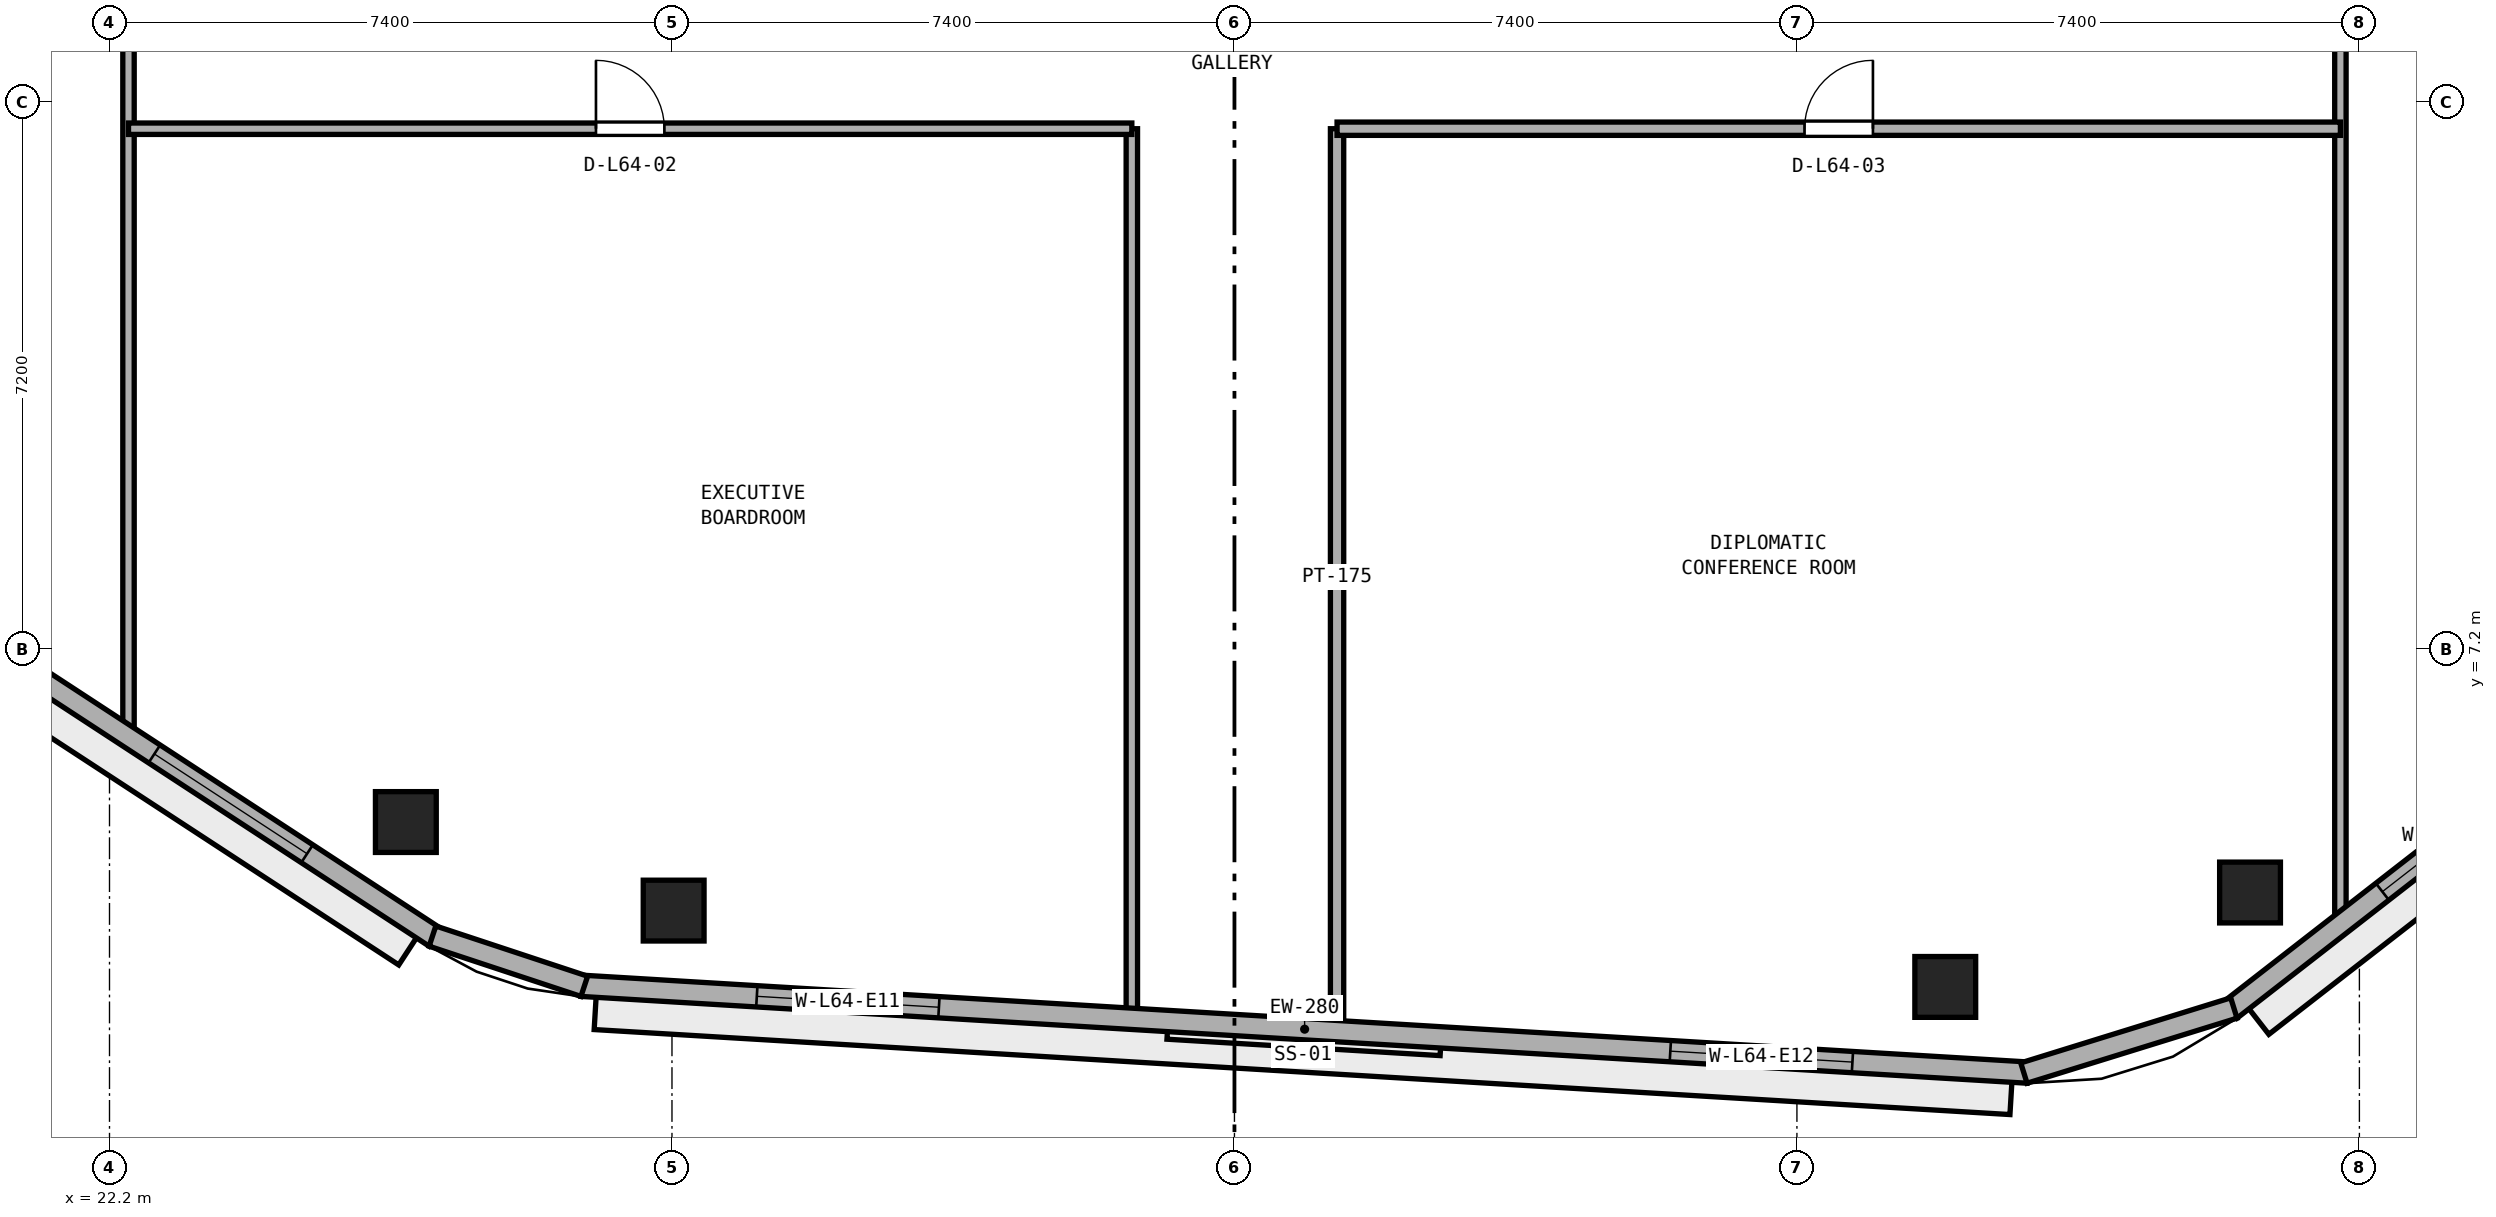
"""IFC4 building model, lengths in metres.
Left out: names, types, materials, properties, quantities, classifications, styles, units other than length and angle.
Written with IfcOpenShell. Run it as: python <this file> out.ifc"""

import sys

from ifc_helpers import new_model, si_unit, direction, frame, frame_2d, origin, origin_2d, place, context, subcontext, project, spatial, rectangle, extrude, element, fill, save


model = new_model("IFC4")
c1 = context("Model", 3, precision=1e-05, world=origin(), true_north=direction((0.0, 1.0)))
c2 = subcontext(c1, "Body", "Model", "MODEL_VIEW")
j1 = project(units=[si_unit("LENGTHUNIT", "METRE"), si_unit("PLANEANGLEUNIT", "RADIAN")], contexts=[c1])
p1 = place(None, origin())
s1 = spatial("IfcSite", under=j1, at=p1, CompositionType="ELEMENT")
p2 = place(p1, origin())
s2 = spatial("IfcBuilding", under=s1, at=p2, CompositionType="ELEMENT")
p3 = place(p2, frame((0.0, 0.0, 251.6)))
s3 = spatial("IfcBuildingStorey", under=s2, at=p3, CompositionType="ELEMENT", Elevation=251.6)
for number, where, z_axis, x_axis in (
    (1, (29.622, 3.764, 0.0), (0.0, 0.0, 1.0), (1.0, 0.0, 0.0)),
    (2, (46.352, 2.76, 0.0), (0.0, 0.0, 1.0), (1.0, 0.0, 0.0)),
    (3, (50.361, 4.002, 0.0), (0.0, 0.0, 1.0), (1.0, 0.0, 0.0)),
    (4, (26.099, 4.929, 0.0), (0.0, 0.0, 1.0), (1.0, 0.0, 0.0)),
):
    element("IfcColumn", number, at=place(p3, frame(where, z_axis=z_axis, x_axis=x_axis)), inside=s3, PredefinedType="COLUMN", context=c2, shape_type="SweptSolid", body=[
        extrude(rectangle(XDim=0.8, YDim=0.8, at=origin_2d()), origin(), (0.0, 0.0, 1.0), 3.8),
    ])
p4 = place(p3, frame((51.55, 3.546, 0.0), z_axis=(0.0, 0.0, 1.0), x_axis=(0.0, 1.0, 0.0)))
e5 = element("IfcWall", 5, at=p4, inside=s3, PredefinedType="PARTITIONING", context=c2, shape_type="SweptSolid", body=[
    extrude(rectangle(XDim=24.254, YDim=0.15, at=frame_2d((12.127, 0.0))), origin(), (0.0, 0.0, 1.0), 3.51),
])
p5 = place(p4, frame((16.759, 0.0, 0.0)))
e6 = element("IfcOpeningElement", 6, at=p5, cuts=e5, PredefinedType="OPENING", context=c2, shape_type="SweptSolid", body=[
    extrude(rectangle(XDim=1.0, YDim=2.12, at=frame_2d((0.5, 1.06))), frame((0.0, 0.085, 0.0), z_axis=(0.0, -1.0, 0.0), x_axis=(1.0, 0.0, 0.0)), (0.0, 0.0, 1.0), 0.17),
])
p6 = place(p3, frame((38.35, 2.243, 0.0), z_axis=(0.0, 0.0, 1.0), x_axis=(0.0, 1.0, 0.0)))
e7 = element("IfcWall", 7, at=p6, inside=s3, PredefinedType="PARTITIONING", context=c2, shape_type="SweptSolid", body=[
    extrude(rectangle(XDim=11.807, YDim=0.175, at=frame_2d((5.904, 0.0))), origin(), (0.0, 0.0, 1.0), 3.51),
])
p7 = place(p3, frame((35.65, 2.405, 0.0), z_axis=(0.0, 0.0, 1.0), x_axis=(0.0, 1.0, 0.0)))
e8 = element("IfcWall", 8, at=p7, inside=s3, PredefinedType="PARTITIONING", context=c2, shape_type="SweptSolid", body=[
    extrude(rectangle(XDim=11.645, YDim=0.15, at=frame_2d((5.823, 0.0))), origin(), (0.0, 0.0, 1.0), 3.51),
])
p8 = place(p3, frame((22.45, 6.02, 0.0), z_axis=(0.0, 0.0, 1.0), x_axis=(0.0, 1.0, 0.0)))
e9 = element("IfcWall", 9, at=p8, inside=s3, PredefinedType="PARTITIONING", context=c2, shape_type="SweptSolid", body=[
    extrude(rectangle(XDim=38.106, YDim=0.15, at=frame_2d((19.053, 0.0))), origin(), (0.0, 0.0, 1.0), 3.51),
])
p9 = place(p8, frame((11.005, 0.0, 0.0)))
e10 = element("IfcOpeningElement", 10, at=p9, cuts=e9, PredefinedType="OPENING", context=c2, shape_type="SweptSolid", body=[
    extrude(rectangle(XDim=0.9, YDim=2.1, at=frame_2d((0.45, 1.05))), frame((0.0, 0.085, 0.0), z_axis=(0.0, -1.0, 0.0), x_axis=(1.0, 0.0, 0.0)), (0.0, 0.0, 1.0), 0.17),
])
p10 = place(p8, frame((22.155, 0.0, 0.0)))
e11 = element("IfcOpeningElement", 11, at=p10, cuts=e9, PredefinedType="OPENING", context=c2, shape_type="SweptSolid", body=[
    extrude(rectangle(XDim=0.9, YDim=2.1, at=frame_2d((0.45, 1.05))), frame((0.0, 0.085, 0.0), z_axis=(0.0, -1.0, 0.0), x_axis=(1.0, 0.0, 0.0)), (0.0, 0.0, 1.0), 0.17),
])
p11 = place(p3, frame((22.45, 14.05, 0.0), z_axis=(0.0, 0.0, 1.0), x_axis=(1.0, 0.0, 0.0)))
e12 = element("IfcWall", 12, at=p11, inside=s3, PredefinedType="PARTITIONING", context=c2, shape_type="SweptSolid", body=[
    extrude(rectangle(XDim=13.2, YDim=0.15, at=frame_2d((6.6, 0.0))), origin(), (0.0, 0.0, 1.0), 3.51),
])
p12 = place(p11, frame((6.15, 0.0, 0.0)))
e13 = element("IfcOpeningElement", 13, at=p12, cuts=e12, PredefinedType="OPENING", context=c2, shape_type="SweptSolid", body=[
    extrude(rectangle(XDim=0.9, YDim=2.1, at=frame_2d((0.45, 1.05))), frame((0.0, 0.085, 0.0), z_axis=(0.0, -1.0, 0.0), x_axis=(1.0, 0.0, 0.0)), (0.0, 0.0, 1.0), 0.17),
])
p13 = place(p3, frame((38.35, 14.05, 0.0), z_axis=(0.0, 0.0, 1.0), x_axis=(1.0, 0.0, 0.0)))
e14 = element("IfcWall", 14, at=p13, inside=s3, PredefinedType="PARTITIONING", context=c2, shape_type="SweptSolid", body=[
    extrude(rectangle(XDim=13.2, YDim=0.175, at=frame_2d((6.6, 0.0))), origin(), (0.0, 0.0, 1.0), 3.51),
])
p14 = place(p13, frame((6.15, 0.0, 0.0)))
e15 = element("IfcOpeningElement", 15, at=p14, cuts=e14, PredefinedType="OPENING", context=c2, shape_type="SweptSolid", body=[
    extrude(rectangle(XDim=0.9, YDim=2.1, at=frame_2d((0.45, 1.05))), frame((0.0, 0.097, 0.0), z_axis=(0.0, -1.0, 0.0), x_axis=(1.0, 0.0, 0.0)), (0.0, 0.0, 1.0), 0.195),
])
p15 = place(p3, frame((28.411, 2.774, 0.0), z_axis=(0.0, 0.0, 1.0), x_axis=(0.998203068368, -0.059921901676, 0.0)))
e16 = element("IfcWall", 16, at=p15, inside=s3, PredefinedType="STANDARD", context=c2, shape_type="SweptSolid", body=[
    extrude(rectangle(XDim=19.06, YDim=0.28, at=frame_2d((9.53, 0.0))), origin(), (0.0, 0.0, 1.0), 3.51),
])
p16 = place(p15, frame((2.31, 0.0, 0.9)))
e17 = element("IfcOpeningElement", 17, at=p16, cuts=e16, PredefinedType="OPENING", context=c2, shape_type="SweptSolid", body=[
    extrude(rectangle(XDim=2.4, YDim=1.75, at=frame_2d((1.2, 0.875))), frame((0.0, 0.15, 0.0), z_axis=(0.0, -1.0, 0.0), x_axis=(1.0, 0.0, 0.0)), (0.0, 0.0, 1.0), 0.3),
])
p17 = place(p15, frame((14.35, 0.0, 0.9)))
e18 = element("IfcOpeningElement", 18, at=p17, cuts=e16, PredefinedType="OPENING", context=c2, shape_type="SweptSolid", body=[
    extrude(rectangle(XDim=2.4, YDim=1.75, at=frame_2d((1.2, 0.875))), frame((0.0, 0.15, 0.0), z_axis=(0.0, -1.0, 0.0), x_axis=(1.0, 0.0, 0.0)), (0.0, 0.0, 1.0), 0.3),
])
p18 = place(p3, frame((50.104, 2.459, 0.0), z_axis=(0.0, 0.0, 1.0), x_axis=(0.789464857485, 0.613795763097, 0.0)))
e19 = element("IfcWall", 19, at=p18, inside=s3, PredefinedType="STANDARD", context=c2, shape_type="SweptSolid", body=[
    extrude(rectangle(XDim=17.387, YDim=0.28, at=frame_2d((8.694, 0.0))), origin(), (0.0, 0.0, 1.0), 3.51),
])
p19 = place(p18, frame((2.531, 0.0, 0.9)))
e20 = element("IfcOpeningElement", 20, at=p19, cuts=e19, PredefinedType="OPENING", context=c2, shape_type="SweptSolid", body=[
    extrude(rectangle(XDim=2.4, YDim=1.75, at=frame_2d((1.2, 0.875))), frame((0.0, 0.15, 0.0), z_axis=(0.0, -1.0, 0.0), x_axis=(1.0, 0.0, 0.0)), (0.0, 0.0, 1.0), 0.3),
])
p20 = place(p18, frame((7.494, 0.0, 0.9)))
e21 = element("IfcOpeningElement", 21, at=p20, cuts=e19, PredefinedType="OPENING", context=c2, shape_type="SweptSolid", body=[
    extrude(rectangle(XDim=2.4, YDim=1.75, at=frame_2d((1.2, 0.875))), frame((0.0, 0.15, 0.0), z_axis=(0.0, -1.0, 0.0), x_axis=(1.0, 0.0, 0.0)), (0.0, 0.0, 1.0), 0.3),
])
p21 = place(p18, frame((12.956, 0.0, 0.9)))
e22 = element("IfcOpeningElement", 22, at=p21, cuts=e19, PredefinedType="OPENING", context=c2, shape_type="SweptSolid", body=[
    extrude(rectangle(XDim=2.4, YDim=1.75, at=frame_2d((1.2, 0.875))), frame((0.0, 0.15, 0.0), z_axis=(0.0, -1.0, 0.0), x_axis=(1.0, 0.0, 0.0)), (0.0, 0.0, 1.0), 0.3),
])
p22 = place(p3, frame((12.034, 12.854, 0.0), z_axis=(0.0, 0.0, 1.0), x_axis=(0.837118352984, -0.547021812269, 0.0)))
e23 = element("IfcWall", 23, at=p22, inside=s3, PredefinedType="STANDARD", context=c2, shape_type="SweptSolid", body=[
    extrude(rectangle(XDim=17.259, YDim=0.28, at=frame_2d((8.63, 0.0))), origin(), (0.0, 0.0, 1.0), 3.51),
])
p23 = place(p22, frame((2.01, 0.0, 0.9)))
e24 = element("IfcOpeningElement", 24, at=p23, cuts=e23, PredefinedType="OPENING", context=c2, shape_type="SweptSolid", body=[
    extrude(rectangle(XDim=2.4, YDim=1.75, at=frame_2d((1.2, 0.875))), frame((0.0, 0.15, 0.0), z_axis=(0.0, -1.0, 0.0), x_axis=(1.0, 0.0, 0.0)), (0.0, 0.0, 1.0), 0.3),
])
p24 = place(p22, frame((7.43, 0.0, 0.9)))
e25 = element("IfcOpeningElement", 25, at=p24, cuts=e23, PredefinedType="OPENING", context=c2, shape_type="SweptSolid", body=[
    extrude(rectangle(XDim=2.4, YDim=1.75, at=frame_2d((1.2, 0.875))), frame((0.0, 0.15, 0.0), z_axis=(0.0, -1.0, 0.0), x_axis=(1.0, 0.0, 0.0)), (0.0, 0.0, 1.0), 0.3),
])
p25 = place(p22, frame((12.849, 0.0, 0.9)))
e26 = element("IfcOpeningElement", 26, at=p25, cuts=e23, PredefinedType="OPENING", context=c2, shape_type="SweptSolid", body=[
    extrude(rectangle(XDim=2.4, YDim=1.75, at=frame_2d((1.2, 0.875))), frame((0.0, 0.15, 0.0), z_axis=(0.0, -1.0, 0.0), x_axis=(1.0, 0.0, 0.0)), (0.0, 0.0, 1.0), 0.3),
])
p26 = place(p3, frame((47.386, 1.626, 0.0), z_axis=(0.0, 0.0, 1.0), x_axis=(0.955189316149, 0.29599555793, 0.0)))
e27 = element("IfcWall", 27, at=p26, inside=s3, PredefinedType="STANDARD", context=c2, shape_type="SweptSolid", body=[
    extrude(rectangle(XDim=2.892, YDim=0.28, at=frame_2d((1.446, 0.0))), origin(), (0.0, 0.0, 1.0), 3.51),
])
p27 = place(p3, frame((26.449, 3.428, 0.0), z_axis=(0.0, 0.0, 1.0), x_axis=(0.949435039229, -0.313963542923, 0.0)))
e28 = element("IfcWall", 28, at=p27, inside=s3, PredefinedType="STANDARD", context=c2, shape_type="SweptSolid", body=[
    extrude(rectangle(XDim=2.104, YDim=0.28, at=frame_2d((1.052, 0.0))), origin(), (0.0, 0.0, 1.0), 3.51),
])
p28 = place(p12, origin())
e29 = element("IfcDoor", 29, at=p28, inside=s3, OperationType="SINGLE_SWING_LEFT", PredefinedType="DOOR", context=c2, shape_type="SweptSolid", body=[
    extrude(rectangle(XDim=0.9, YDim=2.1, at=frame_2d((0.45, 1.05))), frame((0.0, 0.025, 0.0), z_axis=(0.0, -1.0, 0.0), x_axis=(1.0, 0.0, 0.0)), (0.0, 0.0, 1.0), 0.05),
])
fill(e13, e29)
p29 = place(p14, origin())
e30 = element("IfcDoor", 30, at=p29, inside=s3, OperationType="SINGLE_SWING_RIGHT", PredefinedType="DOOR", context=c2, shape_type="SweptSolid", body=[
    extrude(rectangle(XDim=0.9, YDim=2.1, at=frame_2d((0.45, 1.05))), frame((0.0, 0.025, 0.0), z_axis=(0.0, -1.0, 0.0), x_axis=(1.0, 0.0, 0.0)), (0.0, 0.0, 1.0), 0.05),
])
fill(e15, e30)
p30 = place(p16, origin())
e31 = element("IfcWindow", 31, at=p30, inside=s3, PartitioningType="SINGLE_PANEL", PredefinedType="WINDOW", context=c2, shape_type="SweptSolid", body=[
    extrude(rectangle(XDim=2.4, YDim=1.75, at=frame_2d((1.2, 0.875))), frame((0.0, 0.03, 0.0), z_axis=(0.0, -1.0, 0.0), x_axis=(1.0, 0.0, 0.0)), (0.0, 0.0, 1.0), 0.06),
])
fill(e17, e31)
p31 = place(p17, origin())
e32 = element("IfcWindow", 32, at=p31, inside=s3, PartitioningType="SINGLE_PANEL", PredefinedType="WINDOW", context=c2, shape_type="SweptSolid", body=[
    extrude(rectangle(XDim=2.4, YDim=1.75, at=frame_2d((1.2, 0.875))), frame((0.0, 0.03, 0.0), z_axis=(0.0, -1.0, 0.0), x_axis=(1.0, 0.0, 0.0)), (0.0, 0.0, 1.0), 0.06),
])
fill(e18, e32)
p32 = place(p19, origin())
e33 = element("IfcWindow", 33, at=p32, inside=s3, PartitioningType="SINGLE_PANEL", PredefinedType="WINDOW", context=c2, shape_type="SweptSolid", body=[
    extrude(rectangle(XDim=2.4, YDim=1.75, at=frame_2d((1.2, 0.875))), frame((0.0, 0.03, 0.0), z_axis=(0.0, -1.0, 0.0), x_axis=(1.0, 0.0, 0.0)), (0.0, 0.0, 1.0), 0.06),
])
fill(e20, e33)
p33 = place(p25, origin())
e34 = element("IfcWindow", 34, at=p33, inside=s3, PartitioningType="SINGLE_PANEL", PredefinedType="WINDOW", context=c2, shape_type="SweptSolid", body=[
    extrude(rectangle(XDim=2.4, YDim=1.75, at=frame_2d((1.2, 0.875))), frame((0.0, 0.03, 0.0), z_axis=(0.0, -1.0, 0.0), x_axis=(1.0, 0.0, 0.0)), (0.0, 0.0, 1.0), 0.06),
])
fill(e26, e34)
save(model, sys.argv[1])
